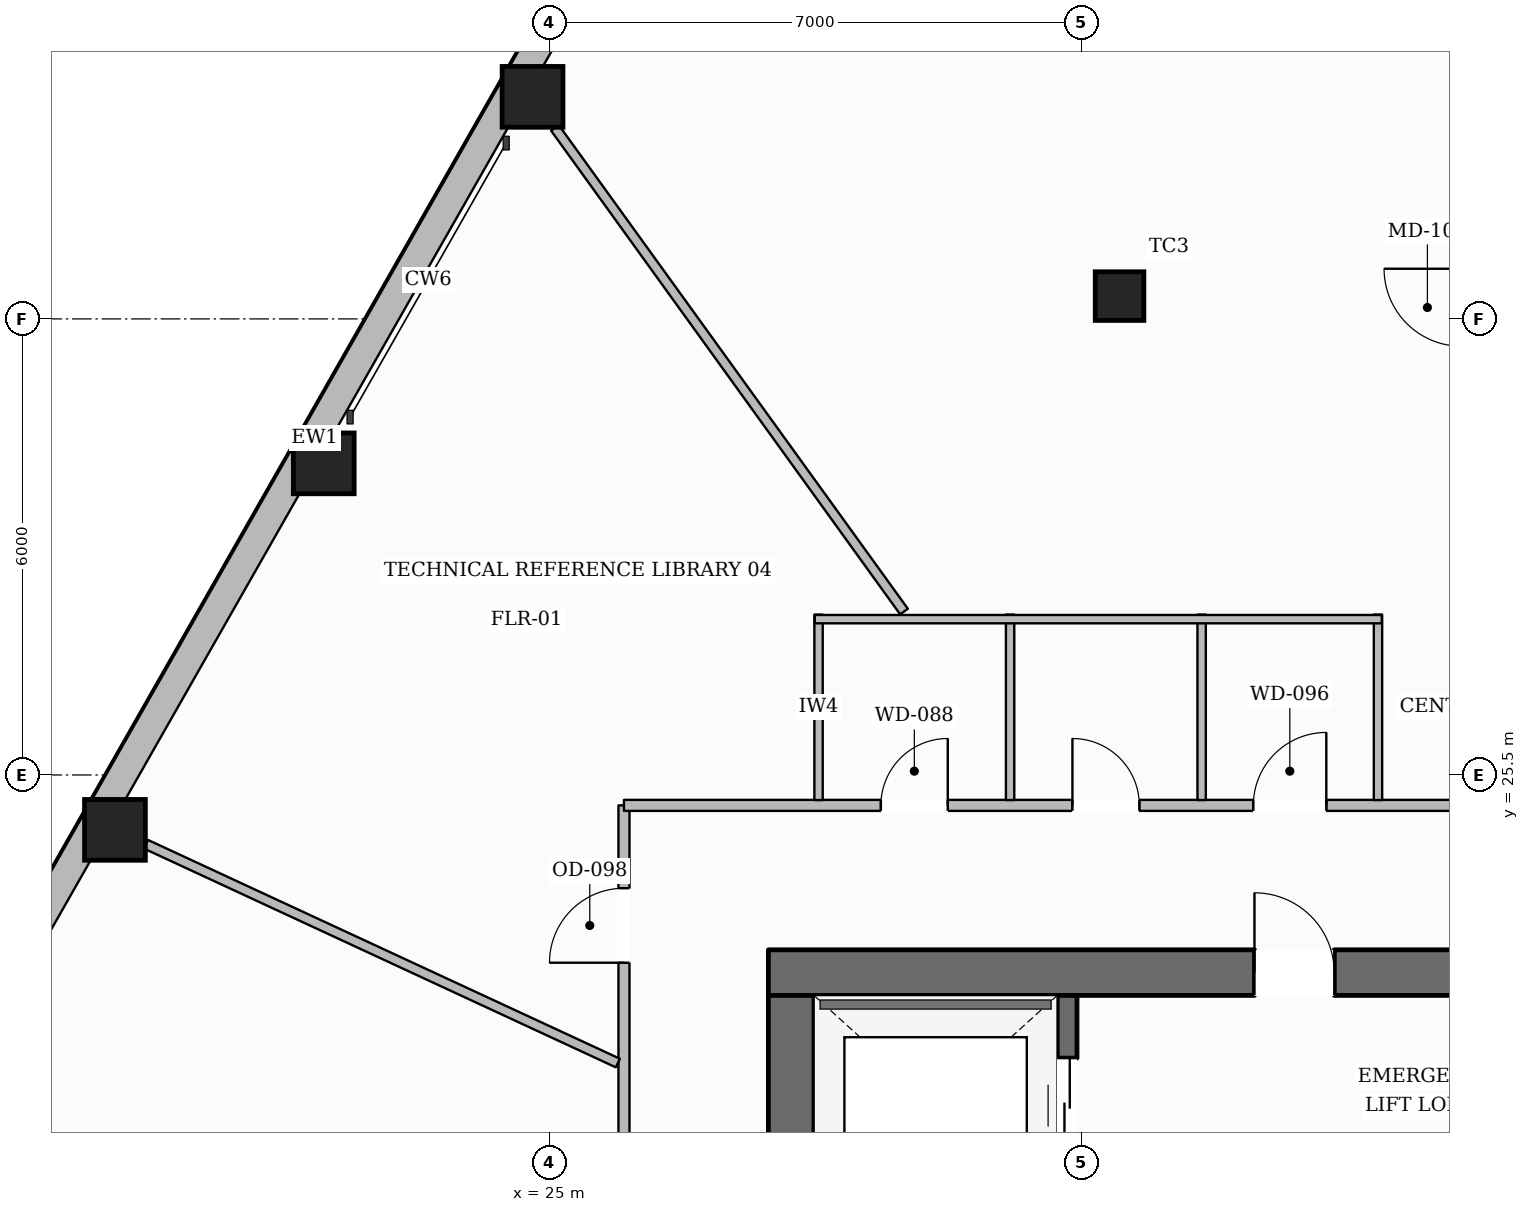
"""IFC4 building model, lengths in metres.
Left out: names, types, materials, properties, quantities, classifications, styles, units other than length and angle.
Written with IfcOpenShell. Run it as: python <this file> out.ifc"""

import sys

from ifc_helpers import new_model, si_unit, direction, frame, frame_2d, origin, origin_2d, place, context, subcontext, project, spatial, rectangle, hollow_rectangle, extrude, element, fill, save


model = new_model("IFC4")
c1 = context("Model", 3, precision=1e-05, world=origin(), true_north=direction((0.0, 1.0)))
c2 = subcontext(c1, "Body", "Model", "MODEL_VIEW")
j1 = project(units=[si_unit("LENGTHUNIT", "METRE"), si_unit("PLANEANGLEUNIT", "RADIAN")], contexts=[c1])
p1 = place(None, origin())
s1 = spatial("IfcSite", under=j1, at=p1, CompositionType="ELEMENT")
p2 = place(p1, origin())
s2 = spatial("IfcBuilding", under=s1, at=p2, CompositionType="ELEMENT")
p3 = place(p2, frame((0.0, 0.0, 32.95)))
s3 = spatial("IfcBuildingStorey", under=s2, at=p3, CompositionType="ELEMENT", Elevation=32.95)
p4 = place(p3, frame((27.88, 22.9, 0.0), z_axis=(0.0, 0.0, 1.0), x_axis=(1.0, 0.0, 0.0)))
e1 = element("IfcWall", 1, at=p4, inside=s3, PredefinedType="SOLIDWALL", context=c2, shape_type="SweptSolid", body=[
    extrude(rectangle(XDim=20.24, YDim=0.6, at=frame_2d((10.12, 0.0))), origin(), (0.0, 0.0, 1.0), 3.59),
])
p5 = place(p4, frame((6.395, 0.0, 0.0)))
e2 = element("IfcOpeningElement", 2, at=p5, cuts=e1, PredefinedType="OPENING", context=c2, shape_type="SweptSolid", body=[
    extrude(rectangle(XDim=1.05, YDim=2.15, at=frame_2d((0.525, 1.075))), frame((0.0, 0.31, 0.0), z_axis=(0.0, -1.0, 0.0), x_axis=(1.0, 0.0, 0.0)), (0.0, 0.0, 1.0), 0.62),
])
p6 = place(p4, frame((12.795, 0.0, 0.0)))
e3 = element("IfcOpeningElement", 3, at=p6, cuts=e1, PredefinedType="OPENING", context=c2, shape_type="SweptSolid", body=[
    extrude(rectangle(XDim=1.05, YDim=2.15, at=frame_2d((0.525, 1.075))), frame((0.0, 0.31, 0.0), z_axis=(0.0, -1.0, 0.0), x_axis=(1.0, 0.0, 0.0)), (0.0, 0.0, 1.0), 0.62),
])
p7 = place(p3, frame((28.18, 9.6, 0.0), z_axis=(0.0, 0.0, 1.0), x_axis=(0.0, 1.0, 0.0)))
e4 = element("IfcWall", 4, at=p7, inside=s3, PredefinedType="SOLIDWALL", context=c2, shape_type="SweptSolid", body=[
    extrude(rectangle(XDim=13.0, YDim=0.6, at=frame_2d((6.5, 0.0))), origin(), (0.0, 0.0, 1.0), 3.59),
])
p8 = place(p7, frame((0.2, 0.0, 0.0)))
e5 = element("IfcOpeningElement", 5, at=p8, cuts=e4, PredefinedType="OPENING", context=c2, shape_type="SweptSolid", body=[
    extrude(rectangle(XDim=1.1, YDim=2.15, at=frame_2d((0.55, 1.075))), frame((0.0, 0.31, 0.0), z_axis=(0.0, -1.0, 0.0), x_axis=(1.0, 0.0, 0.0)), (0.0, 0.0, 1.0), 0.62),
])
p9 = place(p7, frame((8.4, 0.0, 0.0)))
e6 = element("IfcOpeningElement", 6, at=p9, cuts=e4, PredefinedType="OPENING", context=c2, shape_type="SweptSolid", body=[
    extrude(rectangle(XDim=0.9, YDim=2.1, at=frame_2d((0.45, 1.05))), frame((0.0, 0.31, 0.0), z_axis=(0.0, -1.0, 0.0), x_axis=(1.0, 0.0, 0.0)), (0.0, 0.0, 1.0), 0.62),
])
p10 = place(p3, frame((31.81, 9.6, 0.0), z_axis=(0.0, 0.0, 1.0), x_axis=(0.0, 1.0, 0.0)))
e7 = element("IfcWall", 7, at=p10, inside=s3, PredefinedType="SHEAR", context=c2, shape_type="SweptSolid", body=[
    extrude(rectangle(XDim=13.0, YDim=0.26, at=frame_2d((6.5, 0.0))), origin(), (0.0, 0.0, 1.0), 3.59),
])
p11 = place(p10, frame((10.925, 0.0, 0.0)))
e8 = element("IfcOpeningElement", 8, at=p11, cuts=e7, PredefinedType="OPENING", context=c2, shape_type="SweptSolid", body=[
    extrude(rectangle(XDim=1.25, YDim=2.25, at=frame_2d((0.625, 1.125))), frame((0.0, 0.14, 0.0), z_axis=(0.0, -1.0, 0.0), x_axis=(1.0, 0.0, 0.0)), (0.0, 0.0, 1.0), 0.28),
])
for number, where, z_axis, x_axis in (
    (9, (24.777, 34.421, 0.0), (0.0, 0.0, 1.0), (1.0, 0.0, 0.0)),
    (10, (22.03, 29.6, 0.0), (0.0, 0.0, 1.0), (1.0, 0.0, 0.0)),
    (11, (19.283, 24.778, 0.0), (0.0, 0.0, 1.0), (1.0, 0.0, 0.0)),
):
    element("IfcColumn", number, at=place(p3, frame(where, z_axis=z_axis, x_axis=x_axis)), inside=s3, PredefinedType="COLUMN", context=c2, shape_type="SweptSolid", body=[
        extrude(hollow_rectangle(XDim=0.8, YDim=0.8, WallThickness=0.036, at=origin_2d()), origin(), (0.0, 0.0, 1.0), 3.59),
    ])
p12 = place(p3, frame((32.5, 31.8, 0.0), z_axis=(0.0, 0.0, 1.0), x_axis=(1.0, 0.0, 0.0)))
e12 = element("IfcColumn", 12, at=p12, inside=s3, PredefinedType="COLUMN", context=c2, shape_type="SweptSolid", body=[
    extrude(hollow_rectangle(XDim=0.64, YDim=0.64, WallThickness=0.028, at=origin_2d()), origin(), (0.0, 0.0, 1.0), 3.59),
])
p13 = place(p3, frame((13.32, 14.856, 0.0), z_axis=(0.0, 0.0, 1.0), x_axis=(0.495031565758, 0.868874990378, 0.0)))
e13 = element("IfcWall", 13, at=p13, inside=s3, PredefinedType="STANDARD", context=c2, shape_type="SweptSolid", body=[
    extrude(rectangle(XDim=34.25, YDim=0.38, at=frame_2d((17.125, 0.0))), origin(), (0.0, 0.0, 1.0), 2.97),
])
p14 = place(p13, frame((25.087, 0.0, 0.0)))
e14 = element("IfcOpeningElement", 14, at=p14, cuts=e13, PredefinedType="OPENING", context=c2, shape_type="SweptSolid", body=[
    extrude(rectangle(XDim=1.0, YDim=2.2, at=frame_2d((0.5, 1.1))), frame((0.0, 0.2, 0.0), z_axis=(0.0, -1.0, 0.0), x_axis=(1.0, 0.0, 0.0)), (0.0, 0.0, 1.0), 0.4),
])
p15 = place(p13, frame((30.17, 0.0, 0.65)))
e15 = element("IfcOpeningElement", 15, at=p15, cuts=e13, PredefinedType="OPENING", context=c2, shape_type="SweptSolid", body=[
    extrude(rectangle(XDim=1.65, YDim=1.75, at=frame_2d((0.825, 0.875))), frame((0.0, 0.2, 0.0), z_axis=(0.0, -1.0, 0.0), x_axis=(1.0, 0.0, 0.0)), (0.0, 0.0, 1.0), 0.4),
])
p16 = place(p13, frame((7.973, 0.0, 0.65)))
e16 = element("IfcOpeningElement", 16, at=p16, cuts=e13, PredefinedType="OPENING", context=c2, shape_type="SweptSolid", body=[
    extrude(rectangle(XDim=1.65, YDim=1.75, at=frame_2d((0.825, 0.875))), frame((0.0, 0.2, 0.0), z_axis=(0.0, -1.0, 0.0), x_axis=(1.0, 0.0, 0.0)), (0.0, 0.0, 1.0), 0.4),
])
p17 = place(p13, frame((2.424, 0.0, 0.65)))
e17 = element("IfcOpeningElement", 17, at=p17, cuts=e13, PredefinedType="OPENING", context=c2, shape_type="SweptSolid", body=[
    extrude(rectangle(XDim=1.65, YDim=1.75, at=frame_2d((0.825, 0.875))), frame((0.0, 0.2, 0.0), z_axis=(0.0, -1.0, 0.0), x_axis=(1.0, 0.0, 0.0)), (0.0, 0.0, 1.0), 0.4),
])
p18 = place(p3, frame((25.98, 9.1, 0.0), z_axis=(0.0, 0.0, 1.0), x_axis=(0.0, 1.0, 0.0)))
e18 = element("IfcWall", 18, at=p18, inside=s3, PredefinedType="PARTITIONING", context=c2, shape_type="SweptSolid", body=[
    extrude(rectangle(XDim=16.0, YDim=0.145, at=frame_2d((8.0, 0.0))), origin(), (0.0, 0.0, 1.0), 3.278),
])
p19 = place(p18, frame((13.93, 0.0, 0.0)))
e19 = element("IfcOpeningElement", 19, at=p19, cuts=e18, PredefinedType="OPENING", context=c2, shape_type="SweptSolid", body=[
    extrude(rectangle(XDim=0.98, YDim=2.15, at=frame_2d((0.49, 1.075))), frame((0.0, 0.083, 0.0), z_axis=(0.0, -1.0, 0.0), x_axis=(1.0, 0.0, 0.0)), (0.0, 0.0, 1.0), 0.165),
])
p20 = place(p18, frame((7.595, 0.0, 0.0)))
e20 = element("IfcOpeningElement", 20, at=p20, cuts=e18, PredefinedType="OPENING", context=c2, shape_type="SweptSolid", body=[
    extrude(rectangle(XDim=1.4, YDim=2.2, at=frame_2d((0.7, 1.1))), frame((0.0, 0.083, 0.0), z_axis=(0.0, -1.0, 0.0), x_axis=(1.0, 0.0, 0.0)), (0.0, 0.0, 1.0), 0.165),
])
p21 = place(p3, frame((25.98, 25.1, 0.0), z_axis=(0.0, 0.0, 1.0), x_axis=(1.0, 0.0, 0.0)))
e21 = element("IfcWall", 21, at=p21, inside=s3, PredefinedType="PARTITIONING", context=c2, shape_type="SweptSolid", body=[
    extrude(rectangle(XDim=11.02, YDim=0.145, at=frame_2d((5.51, 0.0))), origin(), (0.0, 0.0, 1.0), 3.59),
])
p22 = place(p21, frame((3.38, 0.0, 0.0)))
e22 = element("IfcOpeningElement", 22, at=p22, cuts=e21, PredefinedType="OPENING", context=c2, shape_type="SweptSolid", body=[
    extrude(rectangle(XDim=0.88, YDim=2.1, at=frame_2d((0.44, 1.05))), frame((0.0, 0.083, 0.0), z_axis=(0.0, -1.0, 0.0), x_axis=(1.0, 0.0, 0.0)), (0.0, 0.0, 1.0), 0.165),
])
p23 = place(p21, frame((5.9, 0.0, 0.0)))
e23 = element("IfcOpeningElement", 23, at=p23, cuts=e21, PredefinedType="OPENING", context=c2, shape_type="SweptSolid", body=[
    extrude(rectangle(XDim=0.88, YDim=2.1, at=frame_2d((0.44, 1.05))), frame((0.0, 0.083, 0.0), z_axis=(0.0, -1.0, 0.0), x_axis=(1.0, 0.0, 0.0)), (0.0, 0.0, 1.0), 0.165),
])
p24 = place(p21, frame((8.28, 0.0, 0.0)))
e24 = element("IfcOpeningElement", 24, at=p24, cuts=e21, PredefinedType="OPENING", context=c2, shape_type="SweptSolid", body=[
    extrude(rectangle(XDim=0.96, YDim=2.1, at=frame_2d((0.48, 1.05))), frame((0.0, 0.083, 0.0), z_axis=(0.0, -1.0, 0.0), x_axis=(1.0, 0.0, 0.0)), (0.0, 0.0, 1.0), 0.165),
])
for number, where, z_axis, x_axis in (
    (25, (28.54, 25.17, 0.0), (0.0, 0.0, 1.0), (0.0, 1.0, 0.0)),
    (26, (31.06, 25.17, 0.0), (0.0, 0.0, 1.0), (0.0, 1.0, 0.0)),
    (27, (33.58, 25.17, 0.0), (0.0, 0.0, 1.0), (0.0, 1.0, 0.0)),
    (28, (35.9, 25.17, 0.0), (0.0, 0.0, 1.0), (0.0, 1.0, 0.0)),
):
    element("IfcWall", number, at=place(p3, frame(where, z_axis=z_axis, x_axis=x_axis)), inside=s3, PredefinedType="PLUMBINGWALL", context=c2, shape_type="SweptSolid", body=[
        extrude(rectangle(XDim=2.44, YDim=0.11, at=frame_2d((1.22, 0.0))), origin(), (0.0, 0.0, 1.0), 3.59),
    ])
p25 = place(p3, frame((28.49, 27.55, 0.0), z_axis=(0.0, 0.0, 1.0), x_axis=(1.0, 0.0, 0.0)))
e29 = element("IfcWall", 29, at=p25, inside=s3, PredefinedType="PLUMBINGWALL", context=c2, shape_type="SweptSolid", body=[
    extrude(rectangle(XDim=7.46, YDim=0.11, at=frame_2d((3.73, 0.0))), origin(), (0.0, 0.0, 1.0), 3.59),
])
p26 = place(p3, frame((29.664, 27.65, 0.0), z_axis=(0.0, 0.0, 1.0), x_axis=(-0.585209960971, 0.810881804939, 0.0)))
e30 = element("IfcWall", 30, at=p26, inside=s3, PredefinedType="PARTITIONING", context=c2, shape_type="SweptSolid", body=[
    extrude(rectangle(XDim=7.848, YDim=0.125, at=frame_2d((3.924, 0.0))), origin(), (0.0, 0.0, 1.0), 3.057),
])
p27 = place(p3, frame((25.899, 21.71, 0.0), z_axis=(0.0, 0.0, 1.0), x_axis=(-0.907224939094, 0.420645824757, 0.0)))
e31 = element("IfcWall", 31, at=p27, inside=s3, PredefinedType="PARTITIONING", context=c2, shape_type="SweptSolid", body=[
    extrude(rectangle(XDim=6.843, YDim=0.125, at=frame_2d((3.421, 0.0))), origin(), (0.0, 0.0, 1.0), 3.057),
])
p28 = place(p5, origin())
e32 = element("IfcDoor", 32, at=p28, inside=s3, OperationType="SINGLE_SWING_LEFT", PredefinedType="DOOR", context=c2, shape_type="SweptSolid", body=[
    extrude(rectangle(XDim=1.05, YDim=2.15, at=frame_2d((0.525, 1.075))), frame((0.0, 0.025, 0.0), z_axis=(0.0, -1.0, 0.0), x_axis=(1.0, 0.0, 0.0)), (0.0, 0.0, 1.0), 0.05),
])
fill(e2, e32)
p29 = place(p11, origin())
e33 = element("IfcDoor", 33, at=p29, inside=s3, OperationType="DOUBLE_DOOR_SLIDING", PredefinedType="DOOR", context=c2, shape_type="SweptSolid", body=[
    extrude(rectangle(XDim=1.25, YDim=2.25, at=frame_2d((0.625, 1.125))), frame((0.0, 0.025, 0.0), z_axis=(0.0, -1.0, 0.0), x_axis=(1.0, 0.0, 0.0)), (0.0, 0.0, 1.0), 0.05),
])
fill(e8, e33)
p30 = place(p22, origin())
e34 = element("IfcDoor", 34, at=p30, inside=s3, OperationType="SINGLE_SWING_RIGHT", PredefinedType="DOOR", context=c2, shape_type="SweptSolid", body=[
    extrude(rectangle(XDim=0.88, YDim=2.1, at=frame_2d((0.44, 1.05))), frame((0.0, 0.025, 0.0), z_axis=(0.0, -1.0, 0.0), x_axis=(1.0, 0.0, 0.0)), (0.0, 0.0, 1.0), 0.05),
])
fill(e22, e34)
p31 = place(p23, origin())
e35 = element("IfcDoor", 35, at=p31, inside=s3, OperationType="SINGLE_SWING_LEFT", PredefinedType="DOOR", context=c2, shape_type="SweptSolid", body=[
    extrude(rectangle(XDim=0.88, YDim=2.1, at=frame_2d((0.44, 1.05))), frame((0.0, 0.025, 0.0), z_axis=(0.0, -1.0, 0.0), x_axis=(1.0, 0.0, 0.0)), (0.0, 0.0, 1.0), 0.05),
])
fill(e23, e35)
p32 = place(p24, origin())
e36 = element("IfcDoor", 36, at=p32, inside=s3, OperationType="SINGLE_SWING_RIGHT", PredefinedType="DOOR", context=c2, shape_type="SweptSolid", body=[
    extrude(rectangle(XDim=0.96, YDim=2.1, at=frame_2d((0.48, 1.05))), frame((0.0, 0.025, 0.0), z_axis=(0.0, -1.0, 0.0), x_axis=(1.0, 0.0, 0.0)), (0.0, 0.0, 1.0), 0.05),
])
fill(e24, e36)
p33 = place(p19, origin())
e37 = element("IfcDoor", 37, at=p33, inside=s3, OperationType="SINGLE_SWING_LEFT", PredefinedType="DOOR", context=c2, shape_type="SweptSolid", body=[
    extrude(rectangle(XDim=0.98, YDim=2.15, at=frame_2d((0.49, 1.075))), frame((0.0, 0.025, 0.0), z_axis=(0.0, -1.0, 0.0), x_axis=(1.0, 0.0, 0.0)), (0.0, 0.0, 1.0), 0.05),
])
fill(e19, e37)
save(model, sys.argv[1])
